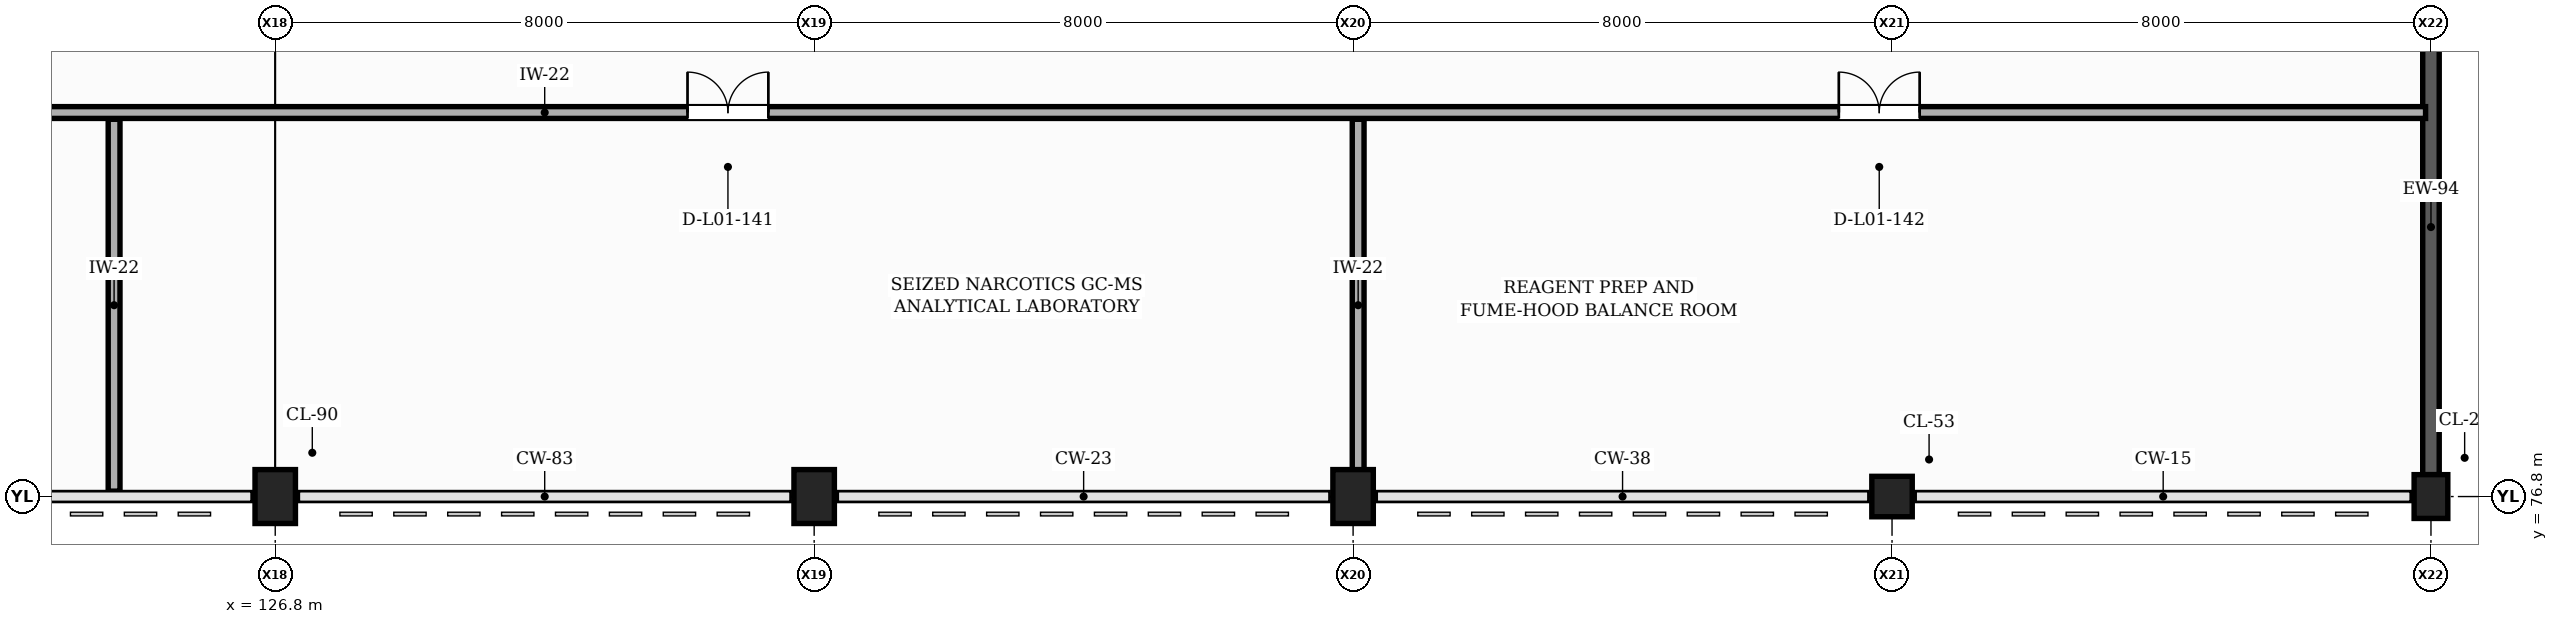
"""IFC4 building model, lengths in metres.
Left out: names, types, materials, properties, quantities, classifications, styles, units other than length and angle.
Written with IfcOpenShell. Run it as: python <this file> out.ifc"""

import sys

from ifc_helpers import new_model, si_unit, direction, frame, frame_2d, origin, origin_2d, place, context, subcontext, project, spatial, rectangle, extrude, element, fill, save


model = new_model("IFC4")
c1 = context("Model", 3, precision=1e-05, world=origin(), true_north=direction((0.0, 1.0)))
c2 = subcontext(c1, "Body", "Model", "MODEL_VIEW")
j1 = project(units=[si_unit("LENGTHUNIT", "METRE"), si_unit("PLANEANGLEUNIT", "RADIAN")], contexts=[c1])
p1 = place(None, origin())
s1 = spatial("IfcSite", under=j1, at=p1, CompositionType="ELEMENT")
p2 = place(p1, origin())
s2 = spatial("IfcBuilding", under=s1, at=p2, CompositionType="ELEMENT")
p3 = place(p2, frame((0.0, 0.0, 4.8)))
s3 = spatial("IfcBuildingStorey", under=s2, at=p3, CompositionType="ELEMENT", Elevation=4.8)
for number, where, z_axis, x_axis in (
    (1, (126.8, 76.8, 0.0), (0.0, 0.0, 1.0), (1.0, 0.0, 0.0)),
    (2, (134.8, 76.8, 0.0), (0.0, 0.0, 1.0), (1.0, 0.0, 0.0)),
    (3, (142.8, 76.8, 0.0), (0.0, 0.0, 1.0), (1.0, 0.0, 0.0)),
):
    element("IfcColumn", number, at=place(p3, frame(where, z_axis=z_axis, x_axis=x_axis)), inside=s3, PredefinedType="COLUMN", context=c2, shape_type="SweptSolid", body=[
        extrude(rectangle(XDim=0.6, YDim=0.8, at=origin_2d()), origin(), (0.0, 0.0, 1.0), 4.2),
    ])
p4 = place(p3, frame((150.8, 76.8, 0.0), z_axis=(0.0, 0.0, 1.0), x_axis=(1.0, 0.0, 0.0)))
e4 = element("IfcColumn", 4, at=p4, inside=s3, PredefinedType="COLUMN", context=c2, shape_type="SweptSolid", body=[
    extrude(rectangle(XDim=0.6, YDim=0.6, at=origin_2d()), origin(), (0.0, 0.0, 1.0), 4.2),
])
p5 = place(p3, frame((158.8, 76.8, 0.0), z_axis=(0.0, 0.0, 1.0), x_axis=(1.0, 0.0, 0.0)))
e5 = element("IfcColumn", 5, at=p5, inside=s3, PredefinedType="COLUMN", context=c2, shape_type="SweptSolid", body=[
    extrude(rectangle(XDim=0.5, YDim=0.65, at=origin_2d()), origin(), (0.0, 0.0, 1.0), 4.2),
])
p6 = place(p3, frame((158.8, 77.125, 0.0), z_axis=(0.0, 0.0, 1.0), x_axis=(0.0, 1.0, 0.0)))
e6 = element("IfcWall", 6, at=p6, inside=s3, PredefinedType="SOLIDWALL", context=c2, shape_type="SweptSolid", body=[
    extrude(rectangle(XDim=7.35, YDim=0.245, at=frame_2d((3.675, 0.0))), origin(), (0.0, 0.0, 1.0), 3.26),
])
p7 = place(p3, frame((124.408, 76.88, 0.0), z_axis=(0.0, 0.0, 1.0), x_axis=(0.0, 1.0, 0.0)))
e7 = element("IfcWall", 7, at=p7, inside=s3, PredefinedType="PARTITIONING", context=c2, shape_type="SweptSolid", body=[
    extrude(rectangle(XDim=5.52, YDim=0.175, at=frame_2d((2.76, 0.0))), origin(), (0.0, 0.0, 1.0), 3.145),
])
p8 = place(p3, frame((142.875, 76.88, 0.0), z_axis=(0.0, 0.0, 1.0), x_axis=(0.0, 1.0, 0.0)))
e8 = element("IfcWall", 8, at=p8, inside=s3, PredefinedType="PARTITIONING", context=c2, shape_type="SweptSolid", body=[
    extrude(rectangle(XDim=5.52, YDim=0.175, at=frame_2d((2.76, 0.0))), origin(), (0.0, 0.0, 1.0), 3.195),
])
p9 = place(p3, frame((102.88, 82.5, 0.0), z_axis=(0.0, 0.0, 1.0), x_axis=(1.0, 0.0, 0.0)))
e9 = element("IfcWall", 9, at=p9, inside=s3, PredefinedType="PARTITIONING", context=c2, shape_type="SweptSolid", body=[
    extrude(rectangle(XDim=55.84, YDim=0.175, at=frame_2d((27.92, 0.0))), origin(), (0.0, 0.0, 1.0), 3.195),
])
p10 = place(p9, frame((10.11, 0.0, 0.0)))
e10 = element("IfcOpeningElement", 10, at=p10, cuts=e9, PredefinedType="OPENING", context=c2, shape_type="SweptSolid", body=[
    extrude(rectangle(XDim=1.2, YDim=2.2, at=frame_2d((0.6, 1.1))), frame((0.0, 0.098, 0.0), z_axis=(0.0, -1.0, 0.0), x_axis=(1.0, 0.0, 0.0)), (0.0, 0.0, 1.0), 0.195),
])
p11 = place(p9, frame((30.04, 0.0, 0.0)))
e11 = element("IfcOpeningElement", 11, at=p11, cuts=e9, PredefinedType="OPENING", context=c2, shape_type="SweptSolid", body=[
    extrude(rectangle(XDim=1.2, YDim=2.2, at=frame_2d((0.6, 1.1))), frame((0.0, 0.098, 0.0), z_axis=(0.0, -1.0, 0.0), x_axis=(1.0, 0.0, 0.0)), (0.0, 0.0, 1.0), 0.195),
])
p12 = place(p9, frame((47.13, 0.0, 0.0)))
e12 = element("IfcOpeningElement", 12, at=p12, cuts=e9, PredefinedType="OPENING", context=c2, shape_type="SweptSolid", body=[
    extrude(rectangle(XDim=1.2, YDim=2.2, at=frame_2d((0.6, 1.1))), frame((0.0, 0.098, 0.0), z_axis=(0.0, -1.0, 0.0), x_axis=(1.0, 0.0, 0.0)), (0.0, 0.0, 1.0), 0.195),
])
p13 = place(p11, origin())
e13 = element("IfcDoor", 13, at=p13, inside=s3, OperationType="DOUBLE_DOOR_SINGLE_SWING", PredefinedType="DOOR", context=c2, shape_type="SweptSolid", body=[
    extrude(rectangle(XDim=1.2, YDim=2.2, at=frame_2d((0.6, 1.1))), frame((0.0, 0.025, 0.0), z_axis=(0.0, -1.0, 0.0), x_axis=(1.0, 0.0, 0.0)), (0.0, 0.0, 1.0), 0.05),
])
fill(e11, e13)
p14 = place(p12, origin())
e14 = element("IfcDoor", 14, at=p14, inside=s3, OperationType="DOUBLE_DOOR_SINGLE_SWING", PredefinedType="DOOR", context=c2, shape_type="SweptSolid", body=[
    extrude(rectangle(XDim=1.2, YDim=2.2, at=frame_2d((0.6, 1.1))), frame((0.0, 0.025, 0.0), z_axis=(0.0, -1.0, 0.0), x_axis=(1.0, 0.0, 0.0)), (0.0, 0.0, 1.0), 0.05),
])
fill(e12, e14)
save(model, sys.argv[1])
